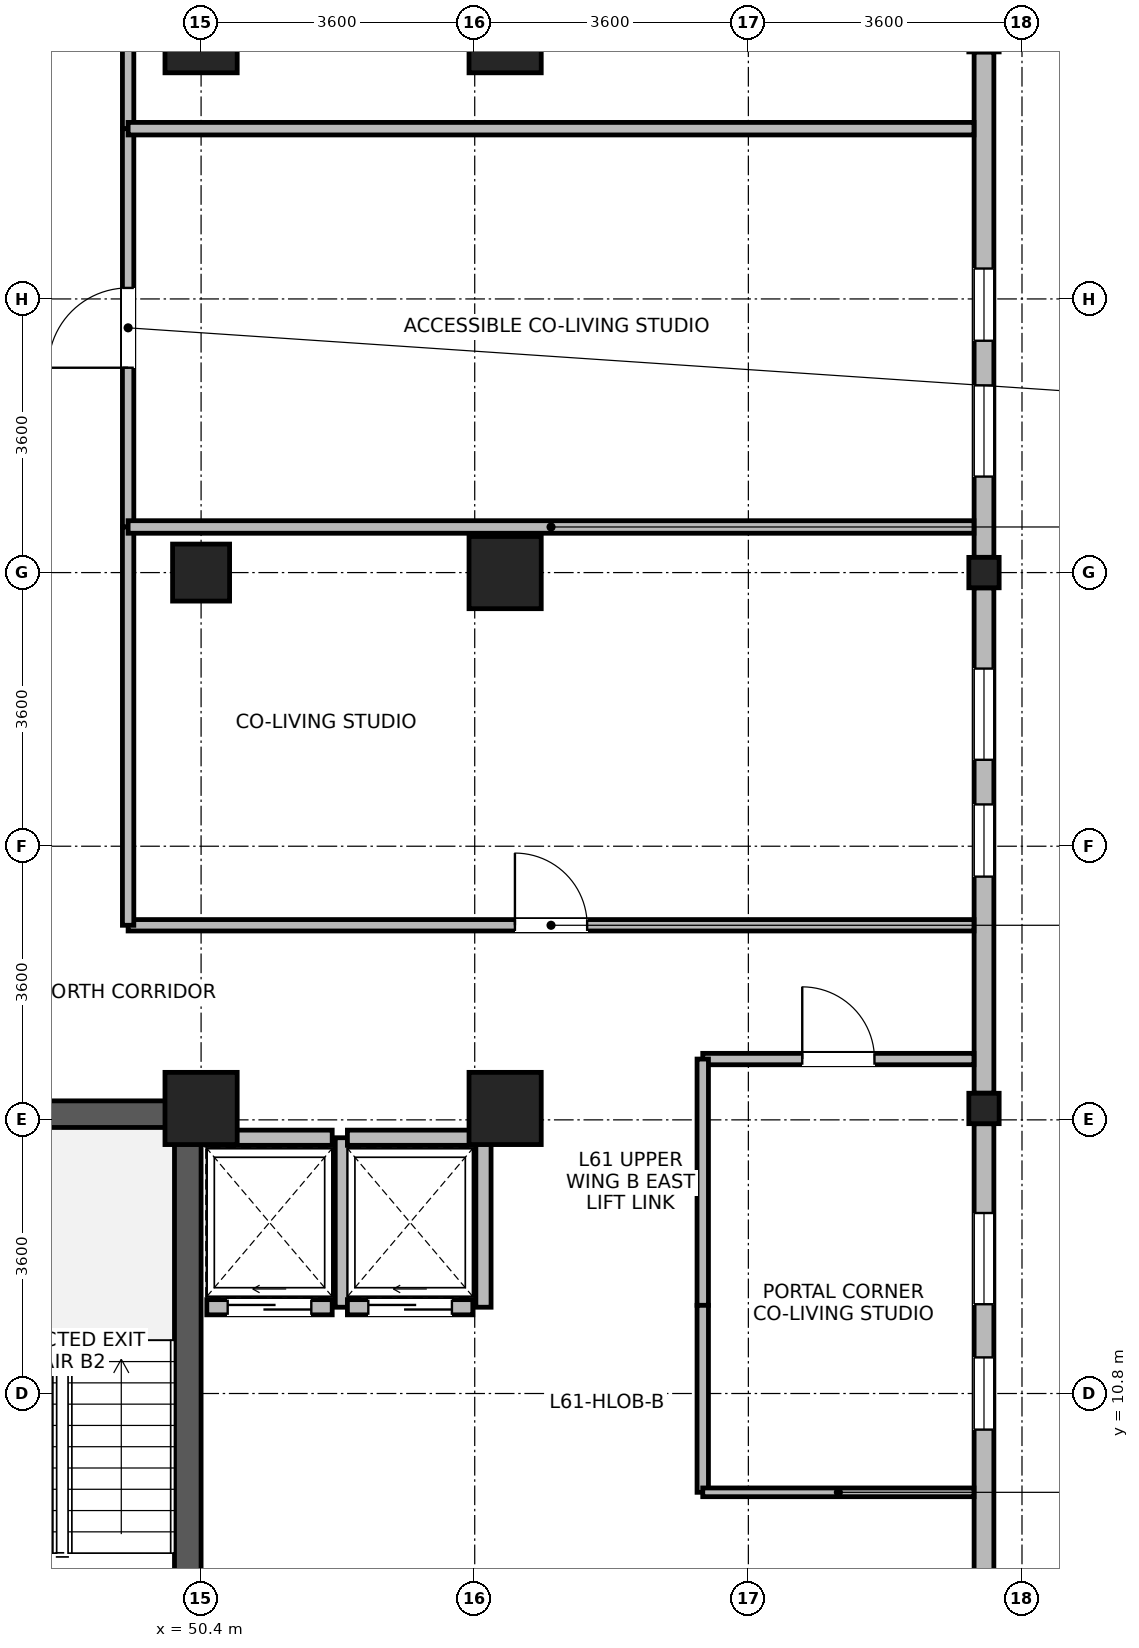
"""IFC4 building model, lengths in metres.
Left out: names, types, materials, properties, quantities, classifications, styles, units other than length and angle.
Written with IfcOpenShell. Run it as: python <this file> out.ifc"""

import sys

from ifc_helpers import new_model, si_unit, direction, frame, frame_2d, origin, origin_2d, place, context, subcontext, project, spatial, rectangle, i_section, extrude, source, transform, mapped, element, fill, save


model = new_model("IFC4")
c1 = context("Model", 3, precision=1e-05, world=origin(), true_north=direction((0.0, 1.0)))
c2 = subcontext(c1, "Body", "Model", "MODEL_VIEW")
j1 = project(units=[si_unit("LENGTHUNIT", "METRE"), si_unit("PLANEANGLEUNIT", "RADIAN")], contexts=[c1])
p1 = place(None, origin())
s1 = spatial("IfcSite", under=j1, at=p1, CompositionType="ELEMENT")
p2 = place(p1, origin())
s2 = spatial("IfcBuilding", under=s1, at=p2, CompositionType="ELEMENT")
p3 = place(p2, frame((0.0, 0.0, 238.8)))
s3 = spatial("IfcBuildingStorey", under=s2, at=p3, CompositionType="ELEMENT", Elevation=238.8)
p4 = place(p3, frame((50.225, 6.95, 0.0), z_axis=(0.0, 0.0, 1.0), x_axis=(0.0, 1.0, 0.0)))
e1 = element("IfcWall", 1, at=p4, inside=s3, PredefinedType="SHEAR", context=c2, shape_type="SweptSolid", body=[
    extrude(rectangle(XDim=7.7, YDim=0.35, at=frame_2d((3.85, 0.0))), origin(), (0.0, 0.0, 1.0), 3.44),
])
p5 = place(p3, frame((46.85, 14.475, 0.0), z_axis=(0.0, 0.0, 1.0), x_axis=(1.0, 0.0, 0.0)))
e2 = element("IfcWall", 2, at=p5, inside=s3, PredefinedType="SHEAR", context=c2, shape_type="SweptSolid", body=[
    extrude(rectangle(XDim=3.2, YDim=0.35, at=frame_2d((1.6, 0.0))), origin(), (0.0, 0.0, 1.0), 3.44),
])
m1 = source(origin(), c2, "Body", "SweptSolid", [
    extrude(rectangle(XDim=0.95, YDim=0.95, at=origin_2d()), origin(), (0.0, 0.0, 1.0), 3.7),
])
p6 = place(p3, frame((50.4, 14.55, 0.0), z_axis=(0.0, 0.0, 1.0), x_axis=(1.0, 0.0, 0.0)))
e3 = element("IfcColumn", 3, at=p6, inside=s3, PredefinedType="COLUMN", context=c2, shape_type="MappedRepresentation", body=[
    mapped(m1, transform((0.0, 0.0, 0.0), x_axis=(1.0, 0.0, 0.0), y_axis=(0.0, 1.0, 0.0), z_axis=(0.0, 0.0, 1.0), scale=1.0)),
])
m2 = source(origin(), c2, "Body", "SweptSolid", [
    extrude(rectangle(XDim=0.75, YDim=0.75, at=origin_2d()), origin(), (0.0, 0.0, 1.0), 3.7),
])
p7 = place(p3, frame((50.4, 21.6, 0.0), z_axis=(0.0, 0.0, 1.0), x_axis=(1.0, 0.0, 0.0)))
e4 = element("IfcColumn", 4, at=p7, inside=s3, PredefinedType="PILASTER", context=c2, shape_type="MappedRepresentation", body=[
    mapped(m2, transform((0.0, 0.0, 0.0), x_axis=(1.0, 0.0, 0.0), y_axis=(0.0, 1.0, 0.0), z_axis=(0.0, 0.0, 1.0), scale=1.0)),
])
for number, where, z_axis, x_axis in (
    (5, (50.4, 28.65, 0.0), (0.0, 0.0, 1.0), (1.0, 0.0, 0.0)),
    (6, (54.4, 14.55, 0.0), (0.0, 0.0, 1.0), (1.0, 0.0, 0.0)),
    (7, (54.4, 21.6, 0.0), (0.0, 0.0, 1.0), (1.0, 0.0, 0.0)),
    (8, (54.4, 28.65, 0.0), (0.0, 0.0, 1.0), (1.0, 0.0, 0.0)),
):
    element("IfcColumn", number, at=place(p3, frame(where, z_axis=z_axis, x_axis=x_axis)), inside=s3, PredefinedType="COLUMN", context=c2, shape_type="MappedRepresentation", body=[
        mapped(m1, transform((0.0, 0.0, 0.0), x_axis=(1.0, 0.0, 0.0), y_axis=(0.0, 1.0, 0.0), z_axis=(0.0, 0.0, 1.0), scale=1.0)),
    ])
m3 = source(origin(), c2, "Body", "SweptSolid", [
    extrude(i_section(OverallWidth=0.399, OverallDepth=0.4, WebThickness=0.017, FlangeThickness=0.023, FilletRadius=0.015, at=origin_2d()), origin(), (0.0, 0.0, 1.0), 3.7),
])
for number, where, z_axis, x_axis in (
    (9, (60.7, 14.55, 0.0), (0.0, 0.0, 1.0), (1.0, 0.0, 0.0)),
    (10, (60.7, 21.6, 0.0), (0.0, 0.0, 1.0), (1.0, 0.0, 0.0)),
):
    element("IfcColumn", number, at=place(p3, frame(where, z_axis=z_axis, x_axis=x_axis)), inside=s3, PredefinedType="COLUMN", context=c2, shape_type="MappedRepresentation", body=[
        mapped(m3, transform((0.0, 0.0, 0.0), x_axis=(1.0, 0.0, 0.0), y_axis=(0.0, 1.0, 0.0), z_axis=(0.0, 0.0, 1.0), scale=1.0)),
    ])
p8 = place(p3, frame((60.7, 14.349, 0.0), z_axis=(0.0, 0.0, 1.0), x_axis=(0.0, -1.0, 0.0)))
e11 = element("IfcWall", 11, at=p8, inside=s3, PredefinedType="STANDARD", context=c2, shape_type="SweptSolid", body=[
    extrude(rectangle(XDim=7.098, YDim=0.26, at=frame_2d((3.549, 0.0))), origin(), (0.0, 0.0, 1.0), 3.02),
])
p9 = place(p8, frame((1.175, 0.0, 0.85)))
e12 = element("IfcOpeningElement", 12, at=p9, cuts=e11, PredefinedType="OPENING", context=c2, shape_type="SweptSolid", body=[
    extrude(rectangle(XDim=1.2, YDim=1.75, at=frame_2d((0.6, 0.875))), frame((0.0, 0.14, 0.0), z_axis=(0.0, -1.0, 0.0), x_axis=(1.0, 0.0, 0.0)), (0.0, 0.0, 1.0), 0.28),
])
p10 = place(p8, frame((3.074, 0.0, 0.85)))
e13 = element("IfcOpeningElement", 13, at=p10, cuts=e11, PredefinedType="OPENING", context=c2, shape_type="SweptSolid", body=[
    extrude(rectangle(XDim=0.95, YDim=1.75, at=frame_2d((0.475, 0.875))), frame((0.0, 0.14, 0.0), z_axis=(0.0, -1.0, 0.0), x_axis=(1.0, 0.0, 0.0)), (0.0, 0.0, 1.0), 0.28),
])
p11 = place(p3, frame((60.7, 21.399, 0.0), z_axis=(0.0, 0.0, 1.0), x_axis=(0.0, -1.0, 0.0)))
e14 = element("IfcWall", 14, at=p11, inside=s3, PredefinedType="STANDARD", context=c2, shape_type="SweptSolid", body=[
    extrude(rectangle(XDim=6.648, YDim=0.26, at=frame_2d((3.324, 0.0))), origin(), (0.0, 0.0, 1.0), 3.02),
])
p12 = place(p11, frame((1.062, 0.0, 0.85)))
e15 = element("IfcOpeningElement", 15, at=p12, cuts=e14, PredefinedType="OPENING", context=c2, shape_type="SweptSolid", body=[
    extrude(rectangle(XDim=1.2, YDim=1.75, at=frame_2d((0.6, 0.875))), frame((0.0, 0.14, 0.0), z_axis=(0.0, -1.0, 0.0), x_axis=(1.0, 0.0, 0.0)), (0.0, 0.0, 1.0), 0.28),
])
p13 = place(p11, frame((2.849, 0.0, 0.85)))
e16 = element("IfcOpeningElement", 16, at=p13, cuts=e14, PredefinedType="OPENING", context=c2, shape_type="SweptSolid", body=[
    extrude(rectangle(XDim=0.95, YDim=1.75, at=frame_2d((0.475, 0.875))), frame((0.0, 0.14, 0.0), z_axis=(0.0, -1.0, 0.0), x_axis=(1.0, 0.0, 0.0)), (0.0, 0.0, 1.0), 0.28),
])
p14 = place(p3, frame((60.7, 28.449, 0.0), z_axis=(0.0, 0.0, 1.0), x_axis=(0.0, -1.0, 0.0)))
e17 = element("IfcWall", 17, at=p14, inside=s3, PredefinedType="STANDARD", context=c2, shape_type="SweptSolid", body=[
    extrude(rectangle(XDim=6.648, YDim=0.26, at=frame_2d((3.324, 0.0))), origin(), (0.0, 0.0, 1.0), 3.02),
])
p15 = place(p14, frame((4.386, 0.0, 0.85)))
e18 = element("IfcOpeningElement", 18, at=p15, cuts=e17, PredefinedType="OPENING", context=c2, shape_type="SweptSolid", body=[
    extrude(rectangle(XDim=1.2, YDim=1.75, at=frame_2d((0.6, 0.875))), frame((0.0, 0.14, 0.0), z_axis=(0.0, -1.0, 0.0), x_axis=(1.0, 0.0, 0.0)), (0.0, 0.0, 1.0), 0.28),
])
p16 = place(p14, frame((2.849, 0.0, 0.85)))
e19 = element("IfcOpeningElement", 19, at=p16, cuts=e17, PredefinedType="OPENING", context=c2, shape_type="SweptSolid", body=[
    extrude(rectangle(XDim=0.95, YDim=1.75, at=frame_2d((0.475, 0.875))), frame((0.0, 0.14, 0.0), z_axis=(0.0, -1.0, 0.0), x_axis=(1.0, 0.0, 0.0)), (0.0, 0.0, 1.0), 0.28),
])
p17 = place(p3, frame((50.475, 11.935, 0.0), z_axis=(0.0, 0.0, 1.0), x_axis=(1.0, 0.0, 0.0)))
e20 = element("IfcWall", 20, at=p17, inside=s3, PredefinedType="PARTITIONING", context=c2, shape_type="SweptSolid", body=[
    extrude(rectangle(XDim=1.65, YDim=0.2, at=frame_2d((0.825, 0.0))), origin(), (0.0, 0.0, 1.0), 3.42),
])
p18 = place(p17, frame((0.275, 0.0, 0.0)))
e21 = element("IfcOpeningElement", 21, at=p18, cuts=e20, PredefinedType="OPENING", context=c2, shape_type="SweptSolid", body=[
    extrude(rectangle(XDim=1.1, YDim=2.12, at=frame_2d((0.55, 1.06))), frame((0.0, 0.11, 0.0), z_axis=(0.0, -1.0, 0.0), x_axis=(1.0, 0.0, 0.0)), (0.0, 0.0, 1.0), 0.22),
])
p19 = place(p3, frame((50.475, 14.165, 0.0), z_axis=(0.0, 0.0, 1.0), x_axis=(1.0, 0.0, 0.0)))
e22 = element("IfcWall", 22, at=p19, inside=s3, PredefinedType="PARTITIONING", context=c2, shape_type="SweptSolid", body=[
    extrude(rectangle(XDim=1.65, YDim=0.2, at=frame_2d((0.825, 0.0))), origin(), (0.0, 0.0, 1.0), 3.42),
])
p20 = place(p3, frame((52.265, 11.935, 0.0), z_axis=(0.0, 0.0, 1.0), x_axis=(0.0, 1.0, 0.0)))
e23 = element("IfcWall", 23, at=p20, inside=s3, PredefinedType="PARTITIONING", context=c2, shape_type="SweptSolid", body=[
    extrude(rectangle(XDim=2.23, YDim=0.2, at=frame_2d((1.115, 0.0))), origin(), (0.0, 0.0, 1.0), 3.42),
])
p21 = place(p3, frame((52.325, 11.935, 0.0), z_axis=(0.0, 0.0, 1.0), x_axis=(1.0, 0.0, 0.0)))
e24 = element("IfcWall", 24, at=p21, inside=s3, PredefinedType="PARTITIONING", context=c2, shape_type="SweptSolid", body=[
    extrude(rectangle(XDim=1.65, YDim=0.2, at=frame_2d((0.825, 0.0))), origin(), (0.0, 0.0, 1.0), 3.42),
])
p22 = place(p21, frame((0.275, 0.0, 0.0)))
e25 = element("IfcOpeningElement", 25, at=p22, cuts=e24, PredefinedType="OPENING", context=c2, shape_type="SweptSolid", body=[
    extrude(rectangle(XDim=1.1, YDim=2.12, at=frame_2d((0.55, 1.06))), frame((0.0, 0.11, 0.0), z_axis=(0.0, -1.0, 0.0), x_axis=(1.0, 0.0, 0.0)), (0.0, 0.0, 1.0), 0.22),
])
p23 = place(p3, frame((52.325, 14.165, 0.0), z_axis=(0.0, 0.0, 1.0), x_axis=(1.0, 0.0, 0.0)))
e26 = element("IfcWall", 26, at=p23, inside=s3, PredefinedType="PARTITIONING", context=c2, shape_type="SweptSolid", body=[
    extrude(rectangle(XDim=1.65, YDim=0.2, at=frame_2d((0.825, 0.0))), origin(), (0.0, 0.0, 1.0), 3.42),
])
p24 = place(p3, frame((54.115, 11.935, 0.0), z_axis=(0.0, 0.0, 1.0), x_axis=(0.0, 1.0, 0.0)))
e27 = element("IfcWall", 27, at=p24, inside=s3, PredefinedType="PARTITIONING", context=c2, shape_type="SweptSolid", body=[
    extrude(rectangle(XDim=2.23, YDim=0.2, at=frame_2d((1.115, 0.0))), origin(), (0.0, 0.0, 1.0), 3.42),
])
p25 = place(p3, frame((49.44, 16.96, 0.0), z_axis=(0.0, 0.0, 1.0), x_axis=(1.0, 0.0, 0.0)))
e28 = element("IfcWall", 28, at=p25, inside=s3, PredefinedType="PARTITIONING", context=c2, shape_type="SweptSolid", body=[
    extrude(rectangle(XDim=11.128, YDim=0.15, at=frame_2d((5.564, 0.0))), origin(), (0.0, 0.0, 1.0), 3.42),
])
p26 = place(p25, frame((5.089, 0.0, 0.0)))
e29 = element("IfcOpeningElement", 29, at=p26, cuts=e28, PredefinedType="OPENING", context=c2, shape_type="SweptSolid", body=[
    extrude(rectangle(XDim=0.95, YDim=2.1, at=frame_2d((0.475, 1.05))), frame((0.0, 0.085, 0.0), z_axis=(0.0, -1.0, 0.0), x_axis=(1.0, 0.0, 0.0)), (0.0, 0.0, 1.0), 0.17),
])
p27 = place(p3, frame((49.44, 27.44, 0.0), z_axis=(0.0, 0.0, 1.0), x_axis=(0.0, 1.0, 0.0)))
e30 = element("IfcWall", 30, at=p27, inside=s3, PredefinedType="PARTITIONING", context=c2, shape_type="SweptSolid", body=[
    extrude(rectangle(XDim=5.26, YDim=0.15, at=frame_2d((2.63, 0.0))), origin(), (0.0, 0.0, 1.0), 3.42),
])
p28 = place(p27, frame((1.98, 0.0, 0.0)))
e31 = element("IfcOpeningElement", 31, at=p28, cuts=e30, PredefinedType="OPENING", context=c2, shape_type="SweptSolid", body=[
    extrude(rectangle(XDim=1.3, YDim=2.12, at=frame_2d((0.65, 1.06))), frame((0.0, 0.085, 0.0), z_axis=(0.0, -1.0, 0.0), x_axis=(1.0, 0.0, 0.0)), (0.0, 0.0, 1.0), 0.17),
])
p29 = place(p3, frame((49.44, 22.2, 0.0), z_axis=(0.0, 0.0, 1.0), x_axis=(0.0, 1.0, 0.0)))
e32 = element("IfcWall", 32, at=p29, inside=s3, PredefinedType="PARTITIONING", context=c2, shape_type="SweptSolid", body=[
    extrude(rectangle(XDim=5.24, YDim=0.15, at=frame_2d((2.62, 0.0))), origin(), (0.0, 0.0, 1.0), 3.42),
])
p30 = place(p29, frame((2.095, 0.0, 0.0)))
e33 = element("IfcOpeningElement", 33, at=p30, cuts=e32, PredefinedType="OPENING", context=c2, shape_type="SweptSolid", body=[
    extrude(rectangle(XDim=1.05, YDim=2.12, at=frame_2d((0.525, 1.06))), frame((0.0, 0.085, 0.0), z_axis=(0.0, -1.0, 0.0), x_axis=(1.0, 0.0, 0.0)), (0.0, 0.0, 1.0), 0.17),
])
p31 = place(p3, frame((49.44, 16.96, 0.0), z_axis=(0.0, 0.0, 1.0), x_axis=(0.0, 1.0, 0.0)))
e34 = element("IfcWall", 34, at=p31, inside=s3, PredefinedType="PARTITIONING", context=c2, shape_type="SweptSolid", body=[
    extrude(rectangle(XDim=5.24, YDim=0.15, at=frame_2d((2.62, 0.0))), origin(), (0.0, 0.0, 1.0), 3.42),
])
p32 = place(p3, frame((57.0, 15.2, 0.0), z_axis=(0.0, 0.0, 1.0), x_axis=(1.0, 0.0, 0.0)))
e35 = element("IfcWall", 35, at=p32, inside=s3, PredefinedType="PARTITIONING", context=c2, shape_type="SweptSolid", body=[
    extrude(rectangle(XDim=3.568, YDim=0.15, at=frame_2d((1.784, 0.0))), origin(), (0.0, 0.0, 1.0), 3.42),
])
p33 = place(p32, frame((1.309, 0.0, 0.0)))
e36 = element("IfcOpeningElement", 36, at=p33, cuts=e35, PredefinedType="OPENING", context=c2, shape_type="SweptSolid", body=[
    extrude(rectangle(XDim=0.95, YDim=2.1, at=frame_2d((0.475, 1.05))), frame((0.0, 0.085, 0.0), z_axis=(0.0, -1.0, 0.0), x_axis=(1.0, 0.0, 0.0)), (0.0, 0.0, 1.0), 0.17),
])
p34 = place(p3, frame((57.0, 11.96, 0.0), z_axis=(0.0, 0.0, 1.0), x_axis=(0.0, 1.0, 0.0)))
e37 = element("IfcWall", 37, at=p34, inside=s3, PredefinedType="PARTITIONING", context=c2, shape_type="SweptSolid", body=[
    extrude(rectangle(XDim=3.24, YDim=0.15, at=frame_2d((1.62, 0.0))), origin(), (0.0, 0.0, 1.0), 3.42),
])
p35 = place(p3, frame((57.0, 9.5, 0.0), z_axis=(0.0, 0.0, 1.0), x_axis=(0.0, 1.0, 0.0)))
e38 = element("IfcWall", 38, at=p35, inside=s3, PredefinedType="PARTITIONING", context=c2, shape_type="SweptSolid", body=[
    extrude(rectangle(XDim=2.46, YDim=0.15, at=frame_2d((1.23, 0.0))), origin(), (0.0, 0.0, 1.0), 3.42),
])
for number, where, z_axis, x_axis in (
    (39, (49.44, 22.2, 0.0), (0.0, 0.0, 1.0), (1.0, 0.0, 0.0)),
    (40, (49.44, 27.44, 0.0), (0.0, 0.0, 1.0), (1.0, 0.0, 0.0)),
):
    element("IfcWall", number, at=place(p3, frame(where, z_axis=z_axis, x_axis=x_axis)), inside=s3, PredefinedType="PARTITIONING", context=c2, shape_type="SweptSolid", body=[
        extrude(rectangle(XDim=11.128, YDim=0.165, at=frame_2d((5.564, 0.0))), origin(), (0.0, 0.0, 1.0), 3.42),
    ])
p36 = place(p3, frame((57.0, 9.5, 0.0), z_axis=(0.0, 0.0, 1.0), x_axis=(1.0, 0.0, 0.0)))
e41 = element("IfcWall", 41, at=p36, inside=s3, PredefinedType="PARTITIONING", context=c2, shape_type="SweptSolid", body=[
    extrude(rectangle(XDim=3.568, YDim=0.115, at=frame_2d((1.784, 0.0))), origin(), (0.0, 0.0, 1.0), 3.42),
])
p37 = place(p9, origin())
e42 = element("IfcWindow", 42, at=p37, inside=s3, PartitioningType="SINGLE_PANEL", PredefinedType="WINDOW", context=c2, shape_type="SweptSolid", body=[
    extrude(rectangle(XDim=1.2, YDim=1.75, at=frame_2d((0.6, 0.875))), frame((0.0, 0.03, 0.0), z_axis=(0.0, -1.0, 0.0), x_axis=(1.0, 0.0, 0.0)), (0.0, 0.0, 1.0), 0.06),
])
fill(e12, e42)
p38 = place(p10, origin())
e43 = element("IfcWindow", 43, at=p38, inside=s3, PartitioningType="SINGLE_PANEL", PredefinedType="WINDOW", context=c2, shape_type="SweptSolid", body=[
    extrude(rectangle(XDim=0.95, YDim=1.75, at=frame_2d((0.475, 0.875))), frame((0.0, 0.03, 0.0), z_axis=(0.0, -1.0, 0.0), x_axis=(1.0, 0.0, 0.0)), (0.0, 0.0, 1.0), 0.06),
])
fill(e13, e43)
p39 = place(p12, origin())
e44 = element("IfcWindow", 44, at=p39, inside=s3, PartitioningType="SINGLE_PANEL", PredefinedType="WINDOW", context=c2, shape_type="SweptSolid", body=[
    extrude(rectangle(XDim=1.2, YDim=1.75, at=frame_2d((0.6, 0.875))), frame((0.0, 0.03, 0.0), z_axis=(0.0, -1.0, 0.0), x_axis=(1.0, 0.0, 0.0)), (0.0, 0.0, 1.0), 0.06),
])
fill(e15, e44)
p40 = place(p13, origin())
e45 = element("IfcWindow", 45, at=p40, inside=s3, PartitioningType="SINGLE_PANEL", PredefinedType="WINDOW", context=c2, shape_type="SweptSolid", body=[
    extrude(rectangle(XDim=0.95, YDim=1.75, at=frame_2d((0.475, 0.875))), frame((0.0, 0.03, 0.0), z_axis=(0.0, -1.0, 0.0), x_axis=(1.0, 0.0, 0.0)), (0.0, 0.0, 1.0), 0.06),
])
fill(e16, e45)
p41 = place(p15, origin())
e46 = element("IfcWindow", 46, at=p41, inside=s3, PartitioningType="SINGLE_PANEL", PredefinedType="WINDOW", context=c2, shape_type="SweptSolid", body=[
    extrude(rectangle(XDim=1.2, YDim=1.75, at=frame_2d((0.6, 0.875))), frame((0.0, 0.03, 0.0), z_axis=(0.0, -1.0, 0.0), x_axis=(1.0, 0.0, 0.0)), (0.0, 0.0, 1.0), 0.06),
])
fill(e18, e46)
p42 = place(p16, origin())
e47 = element("IfcWindow", 47, at=p42, inside=s3, PartitioningType="SINGLE_PANEL", PredefinedType="WINDOW", context=c2, shape_type="SweptSolid", body=[
    extrude(rectangle(XDim=0.95, YDim=1.75, at=frame_2d((0.475, 0.875))), frame((0.0, 0.03, 0.0), z_axis=(0.0, -1.0, 0.0), x_axis=(1.0, 0.0, 0.0)), (0.0, 0.0, 1.0), 0.06),
])
fill(e19, e47)
p43 = place(p18, origin())
e48 = element("IfcDoor", 48, at=p43, inside=s3, OperationType="SLIDING_TO_LEFT", PredefinedType="DOOR", context=c2, shape_type="SweptSolid", body=[
    extrude(rectangle(XDim=1.1, YDim=2.12, at=frame_2d((0.55, 1.06))), frame((0.0, 0.025, 0.0), z_axis=(0.0, -1.0, 0.0), x_axis=(1.0, 0.0, 0.0)), (0.0, 0.0, 1.0), 0.05),
])
fill(e21, e48)
p44 = place(p22, origin())
e49 = element("IfcDoor", 49, at=p44, inside=s3, OperationType="SLIDING_TO_LEFT", PredefinedType="DOOR", context=c2, shape_type="SweptSolid", body=[
    extrude(rectangle(XDim=1.1, YDim=2.12, at=frame_2d((0.55, 1.06))), frame((0.0, 0.025, 0.0), z_axis=(0.0, -1.0, 0.0), x_axis=(1.0, 0.0, 0.0)), (0.0, 0.0, 1.0), 0.05),
])
fill(e25, e49)
p45 = place(p26, origin())
e50 = element("IfcDoor", 50, at=p45, inside=s3, OperationType="SINGLE_SWING_LEFT", PredefinedType="DOOR", context=c2, shape_type="SweptSolid", body=[
    extrude(rectangle(XDim=0.95, YDim=2.1, at=frame_2d((0.475, 1.05))), frame((0.0, 0.025, 0.0), z_axis=(0.0, -1.0, 0.0), x_axis=(1.0, 0.0, 0.0)), (0.0, 0.0, 1.0), 0.05),
])
fill(e29, e50)
p46 = place(p30, origin())
e51 = element("IfcDoor", 51, at=p46, inside=s3, OperationType="SINGLE_SWING_LEFT", PredefinedType="DOOR", context=c2, shape_type="SweptSolid", body=[
    extrude(rectangle(XDim=1.05, YDim=2.12, at=frame_2d((0.525, 1.06))), frame((0.0, 0.025, 0.0), z_axis=(0.0, -1.0, 0.0), x_axis=(1.0, 0.0, 0.0)), (0.0, 0.0, 1.0), 0.05),
])
fill(e33, e51)
p47 = place(p33, origin())
e52 = element("IfcDoor", 52, at=p47, inside=s3, OperationType="SINGLE_SWING_LEFT", PredefinedType="DOOR", context=c2, shape_type="SweptSolid", body=[
    extrude(rectangle(XDim=0.95, YDim=2.1, at=frame_2d((0.475, 1.05))), frame((0.0, 0.025, 0.0), z_axis=(0.0, -1.0, 0.0), x_axis=(1.0, 0.0, 0.0)), (0.0, 0.0, 1.0), 0.05),
])
fill(e36, e52)
save(model, sys.argv[1])
